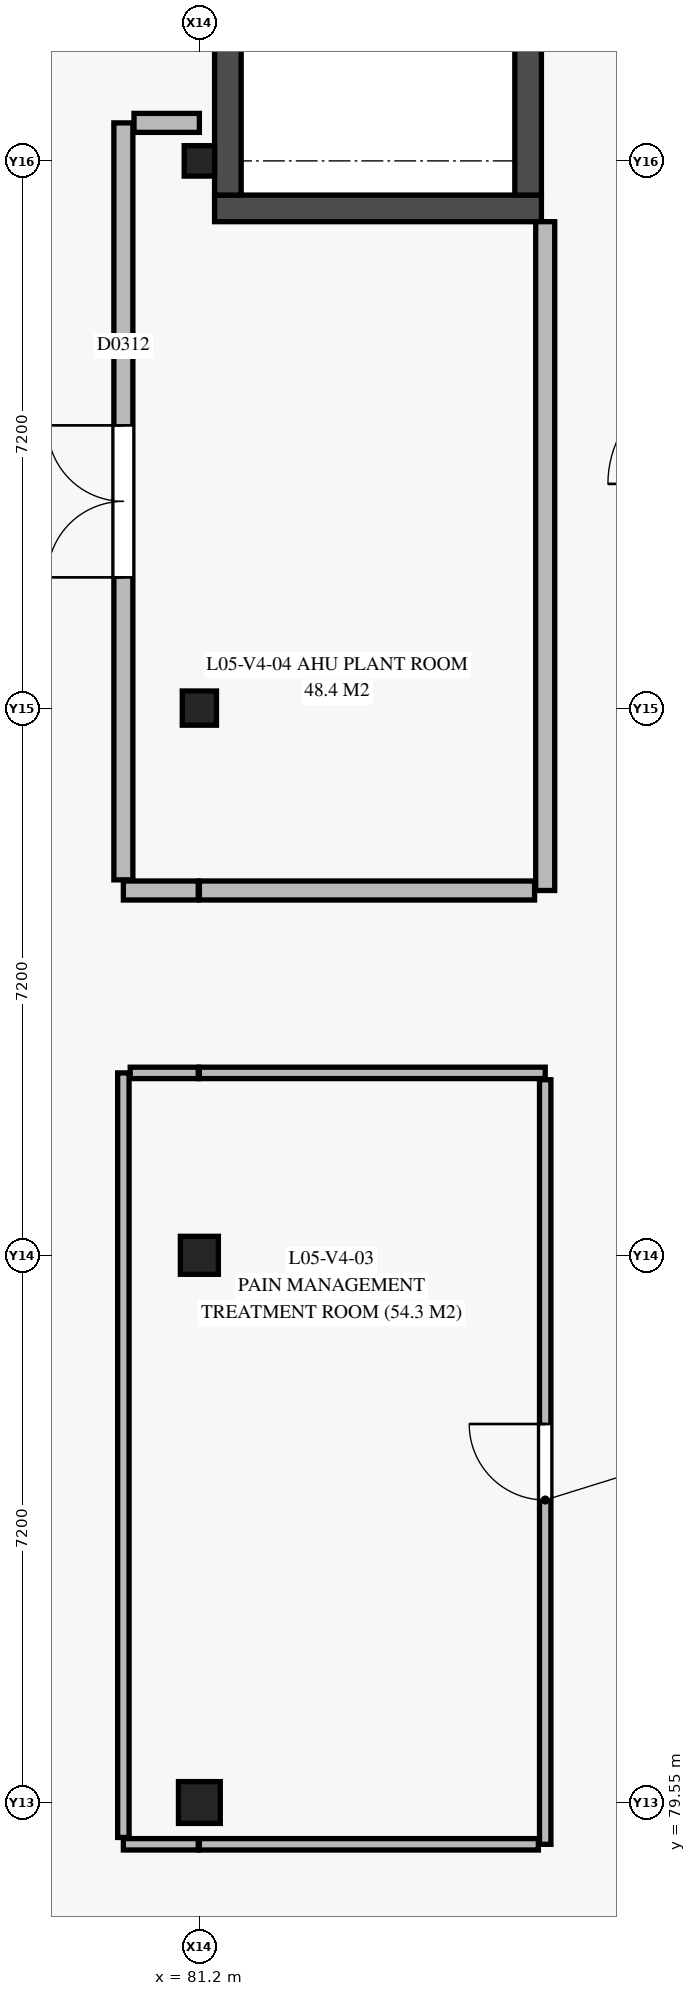
"""IFC4 building model, lengths in metres.
Left out: names, types, materials, properties, quantities, classifications, styles, units other than length and angle.
Written with IfcOpenShell. Run it as: python <this file> out.ifc"""

import sys

from ifc_helpers import new_model, si_unit, direction, frame, frame_2d, origin, origin_2d, place, context, subcontext, project, spatial, rectangle, extrude, element, fill, save


model = new_model("IFC4")
c1 = context("Model", 3, precision=1e-05, world=origin(), true_north=direction((0.0, 1.0)))
c2 = subcontext(c1, "Body", "Model", "MODEL_VIEW")
j1 = project(units=[si_unit("LENGTHUNIT", "METRE"), si_unit("PLANEANGLEUNIT", "RADIAN")], contexts=[c1])
p1 = place(None, origin())
s1 = spatial("IfcSite", under=j1, at=p1, CompositionType="ELEMENT")
p2 = place(p1, origin())
s2 = spatial("IfcBuilding", under=s1, at=p2, CompositionType="ELEMENT")
p3 = place(p2, frame((0.0, 0.0, 21.6)))
s3 = spatial("IfcBuildingStorey", under=s2, at=p3, CompositionType="ELEMENT", Elevation=21.6)
p4 = place(p3, frame((81.2, 79.55, 0.0), z_axis=(0.0, 0.0, 1.0), x_axis=(1.0, 0.0, 0.0)))
e1 = element("IfcColumn", 1, at=p4, inside=s3, PredefinedType="COLUMN", context=c2, shape_type="SweptSolid", body=[
    extrude(rectangle(XDim=0.55, YDim=0.55, at=origin_2d()), origin(), (0.0, 0.0, 1.0), 4.36),
])
p5 = place(p3, frame((81.2, 86.75, 0.0), z_axis=(0.0, 0.0, 1.0), x_axis=(1.0, 0.0, 0.0)))
e2 = element("IfcColumn", 2, at=p5, inside=s3, PredefinedType="COLUMN", context=c2, shape_type="SweptSolid", body=[
    extrude(rectangle(XDim=0.5, YDim=0.5, at=origin_2d()), origin(), (0.0, 0.0, 1.0), 4.36),
])
p6 = place(p3, frame((81.2, 93.95, 0.0), z_axis=(0.0, 0.0, 1.0), x_axis=(1.0, 0.0, 0.0)))
e3 = element("IfcColumn", 3, at=p6, inside=s3, PredefinedType="COLUMN", context=c2, shape_type="SweptSolid", body=[
    extrude(rectangle(XDim=0.45, YDim=0.45, at=origin_2d()), origin(), (0.0, 0.0, 1.0), 4.36),
])
p7 = place(p3, frame((81.2, 101.15, 0.0), z_axis=(0.0, 0.0, 1.0), x_axis=(1.0, 0.0, 0.0)))
e4 = element("IfcColumn", 4, at=p7, inside=s3, PredefinedType="COLUMN", context=c2, shape_type="SweptSolid", body=[
    extrude(rectangle(XDim=0.4, YDim=0.4, at=origin_2d()), origin(), (0.0, 0.0, 1.0), 4.05),
])
p8 = place(p3, frame((81.4, 100.525, 0.0), z_axis=(0.0, 0.0, 1.0), x_axis=(1.0, 0.0, 0.0)))
e5 = element("IfcWall", 5, at=p8, inside=s3, PredefinedType="SHEAR", context=c2, shape_type="SweptSolid", body=[
    extrude(rectangle(XDim=4.3, YDim=0.35, at=frame_2d((2.15, 0.0))), origin(), (0.0, 0.0, 1.0), 4.02),
])
p9 = place(p3, frame((81.575, 100.7, 0.0), z_axis=(0.0, 0.0, 1.0), x_axis=(0.0, 1.0, 0.0)))
e6 = element("IfcWall", 6, at=p9, inside=s3, PredefinedType="SHEAR", context=c2, shape_type="SweptSolid", body=[
    extrude(rectangle(XDim=7.3, YDim=0.35, at=frame_2d((3.65, 0.0))), origin(), (0.0, 0.0, 1.0), 4.02),
])
p10 = place(p3, frame((85.525, 100.7, 0.0), z_axis=(0.0, 0.0, 1.0), x_axis=(0.0, 1.0, 0.0)))
e7 = element("IfcWall", 7, at=p10, inside=s3, PredefinedType="SHEAR", context=c2, shape_type="SweptSolid", body=[
    extrude(rectangle(XDim=7.3, YDim=0.35, at=frame_2d((3.65, 0.0))), origin(), (0.0, 0.0, 1.0), 4.02),
])
p11 = place(p10, frame((5.68, 0.0, 0.0)))
e8 = element("IfcOpeningElement", 8, at=p11, cuts=e7, PredefinedType="OPENING", context=c2, shape_type="SweptSolid", body=[
    extrude(rectangle(XDim=1.5, YDim=2.15, at=frame_2d((0.75, 1.075))), frame((0.0, 0.185, 0.0), z_axis=(0.0, -1.0, 0.0), x_axis=(1.0, 0.0, 0.0)), (0.0, 0.0, 1.0), 0.37),
])
p12 = place(p3, frame((85.75, 91.55, 0.0), z_axis=(0.0, 0.0, 1.0), x_axis=(0.0, 1.0, 0.0)))
e9 = element("IfcWall", 9, at=p12, inside=s3, PredefinedType="PARTITIONING", context=c2, shape_type="SweptSolid", body=[
    extrude(rectangle(XDim=8.8, YDim=0.25, at=frame_2d((4.4, 0.0))), origin(), (0.0, 0.0, 1.0), 3.5),
])
p13 = place(p3, frame((81.2, 91.55, 0.0), z_axis=(0.0, 0.0, 1.0), x_axis=(1.0, 0.0, 0.0)))
e10 = element("IfcWall", 10, at=p13, inside=s3, PredefinedType="PARTITIONING", context=c2, shape_type="SweptSolid", body=[
    extrude(rectangle(XDim=4.41, YDim=0.25, at=frame_2d((2.205, 0.0))), origin(), (0.0, 0.0, 1.0), 3.22),
])
p14 = place(p3, frame((80.2, 91.55, 0.0), z_axis=(0.0, 0.0, 1.0), x_axis=(1.0, 0.0, 0.0)))
e11 = element("IfcWall", 11, at=p14, inside=s3, PredefinedType="PARTITIONING", context=c2, shape_type="SweptSolid", body=[
    extrude(rectangle(XDim=0.985, YDim=0.25, at=frame_2d((0.493, 0.0))), origin(), (0.0, 0.0, 1.0), 3.22),
])
p15 = place(p3, frame((80.2, 91.69, 0.0), z_axis=(0.0, 0.0, 1.0), x_axis=(0.0, 1.0, 0.0)))
e12 = element("IfcWall", 12, at=p15, inside=s3, PredefinedType="PARTITIONING", context=c2, shape_type="SweptSolid", body=[
    extrude(rectangle(XDim=9.96, YDim=0.25, at=frame_2d((4.98, 0.0))), origin(), (0.0, 0.0, 1.0), 3.3),
])
p16 = place(p15, frame((3.98, 0.0, 0.0)))
e13 = element("IfcOpeningElement", 13, at=p16, cuts=e12, PredefinedType="OPENING", context=c2, shape_type="SweptSolid", body=[
    extrude(rectangle(XDim=2.0, YDim=2.4, at=frame_2d((1.0, 1.2))), frame((0.0, 0.135, 0.0), z_axis=(0.0, -1.0, 0.0), x_axis=(1.0, 0.0, 0.0)), (0.0, 0.0, 1.0), 0.27),
])
p17 = place(p3, frame((80.34, 101.65, 0.0), z_axis=(0.0, 0.0, 1.0), x_axis=(1.0, 0.0, 0.0)))
e14 = element("IfcWall", 14, at=p17, inside=s3, PredefinedType="PARTITIONING", context=c2, shape_type="SweptSolid", body=[
    extrude(rectangle(XDim=0.86, YDim=0.25, at=frame_2d((0.43, 0.0))), origin(), (0.0, 0.0, 1.0), 3.44),
])
p18 = place(p3, frame((81.2, 89.15, 0.0), z_axis=(0.0, 0.0, 1.0), x_axis=(1.0, 0.0, 0.0)))
e15 = element("IfcWall", 15, at=p18, inside=s3, PredefinedType="PARTITIONING", context=c2, shape_type="SweptSolid", body=[
    extrude(rectangle(XDim=4.55, YDim=0.15, at=frame_2d((2.275, 0.0))), origin(), (0.0, 0.0, 1.0), 3.22),
])
p19 = place(p3, frame((85.75, 79.0, 0.0), z_axis=(0.0, 0.0, 1.0), x_axis=(0.0, 1.0, 0.0)))
e16 = element("IfcWall", 16, at=p19, inside=s3, PredefinedType="PARTITIONING", context=c2, shape_type="SweptSolid", body=[
    extrude(rectangle(XDim=10.06, YDim=0.15, at=frame_2d((5.03, 0.0))), origin(), (0.0, 0.0, 1.0), 3.32),
])
p20 = place(p19, frame((4.53, 0.0, 0.0)))
e17 = element("IfcOpeningElement", 17, at=p20, cuts=e16, PredefinedType="OPENING", context=c2, shape_type="SweptSolid", body=[
    extrude(rectangle(XDim=1.0, YDim=2.15, at=frame_2d((0.5, 1.075))), frame((0.0, 0.085, 0.0), z_axis=(0.0, -1.0, 0.0), x_axis=(1.0, 0.0, 0.0)), (0.0, 0.0, 1.0), 0.17),
])
p21 = place(p3, frame((81.2, 79.0, 0.0), z_axis=(0.0, 0.0, 1.0), x_axis=(1.0, 0.0, 0.0)))
e18 = element("IfcWall", 18, at=p21, inside=s3, PredefinedType="PARTITIONING", context=c2, shape_type="SweptSolid", body=[
    extrude(rectangle(XDim=4.46, YDim=0.15, at=frame_2d((2.23, 0.0))), origin(), (0.0, 0.0, 1.0), 3.95),
])
p22 = place(p3, frame((80.2, 79.0, 0.0), z_axis=(0.0, 0.0, 1.0), x_axis=(1.0, 0.0, 0.0)))
e19 = element("IfcWall", 19, at=p22, inside=s3, PredefinedType="PARTITIONING", context=c2, shape_type="SweptSolid", body=[
    extrude(rectangle(XDim=0.985, YDim=0.15, at=frame_2d((0.493, 0.0))), origin(), (0.0, 0.0, 1.0), 3.95),
])
p23 = place(p3, frame((80.2, 79.09, 0.0), z_axis=(0.0, 0.0, 1.0), x_axis=(0.0, 1.0, 0.0)))
e20 = element("IfcWall", 20, at=p23, inside=s3, PredefinedType="PARTITIONING", context=c2, shape_type="SweptSolid", body=[
    extrude(rectangle(XDim=10.06, YDim=0.15, at=frame_2d((5.03, 0.0))), origin(), (0.0, 0.0, 1.0), 3.22),
])
p24 = place(p3, frame((80.29, 89.15, 0.0), z_axis=(0.0, 0.0, 1.0), x_axis=(1.0, 0.0, 0.0)))
e21 = element("IfcWall", 21, at=p24, inside=s3, PredefinedType="PARTITIONING", context=c2, shape_type="SweptSolid", body=[
    extrude(rectangle(XDim=0.895, YDim=0.15, at=frame_2d((0.448, 0.0))), origin(), (0.0, 0.0, 1.0), 3.22),
])
p25 = place(p20, origin())
e22 = element("IfcDoor", 22, at=p25, inside=s3, OperationType="SINGLE_SWING_RIGHT", PredefinedType="DOOR", context=c2, shape_type="SweptSolid", body=[
    extrude(rectangle(XDim=1.0, YDim=2.15, at=frame_2d((0.5, 1.075))), frame((0.0, 0.025, 0.0), z_axis=(0.0, -1.0, 0.0), x_axis=(1.0, 0.0, 0.0)), (0.0, 0.0, 1.0), 0.05),
])
fill(e17, e22)
p26 = place(p16, origin())
e23 = element("IfcDoor", 23, at=p26, inside=s3, OperationType="DOUBLE_DOOR_SINGLE_SWING", PredefinedType="DOOR", context=c2, shape_type="SweptSolid", body=[
    extrude(rectangle(XDim=2.0, YDim=2.4, at=frame_2d((1.0, 1.2))), frame((0.0, 0.025, 0.0), z_axis=(0.0, -1.0, 0.0), x_axis=(1.0, 0.0, 0.0)), (0.0, 0.0, 1.0), 0.05),
])
fill(e13, e23)
save(model, sys.argv[1])
